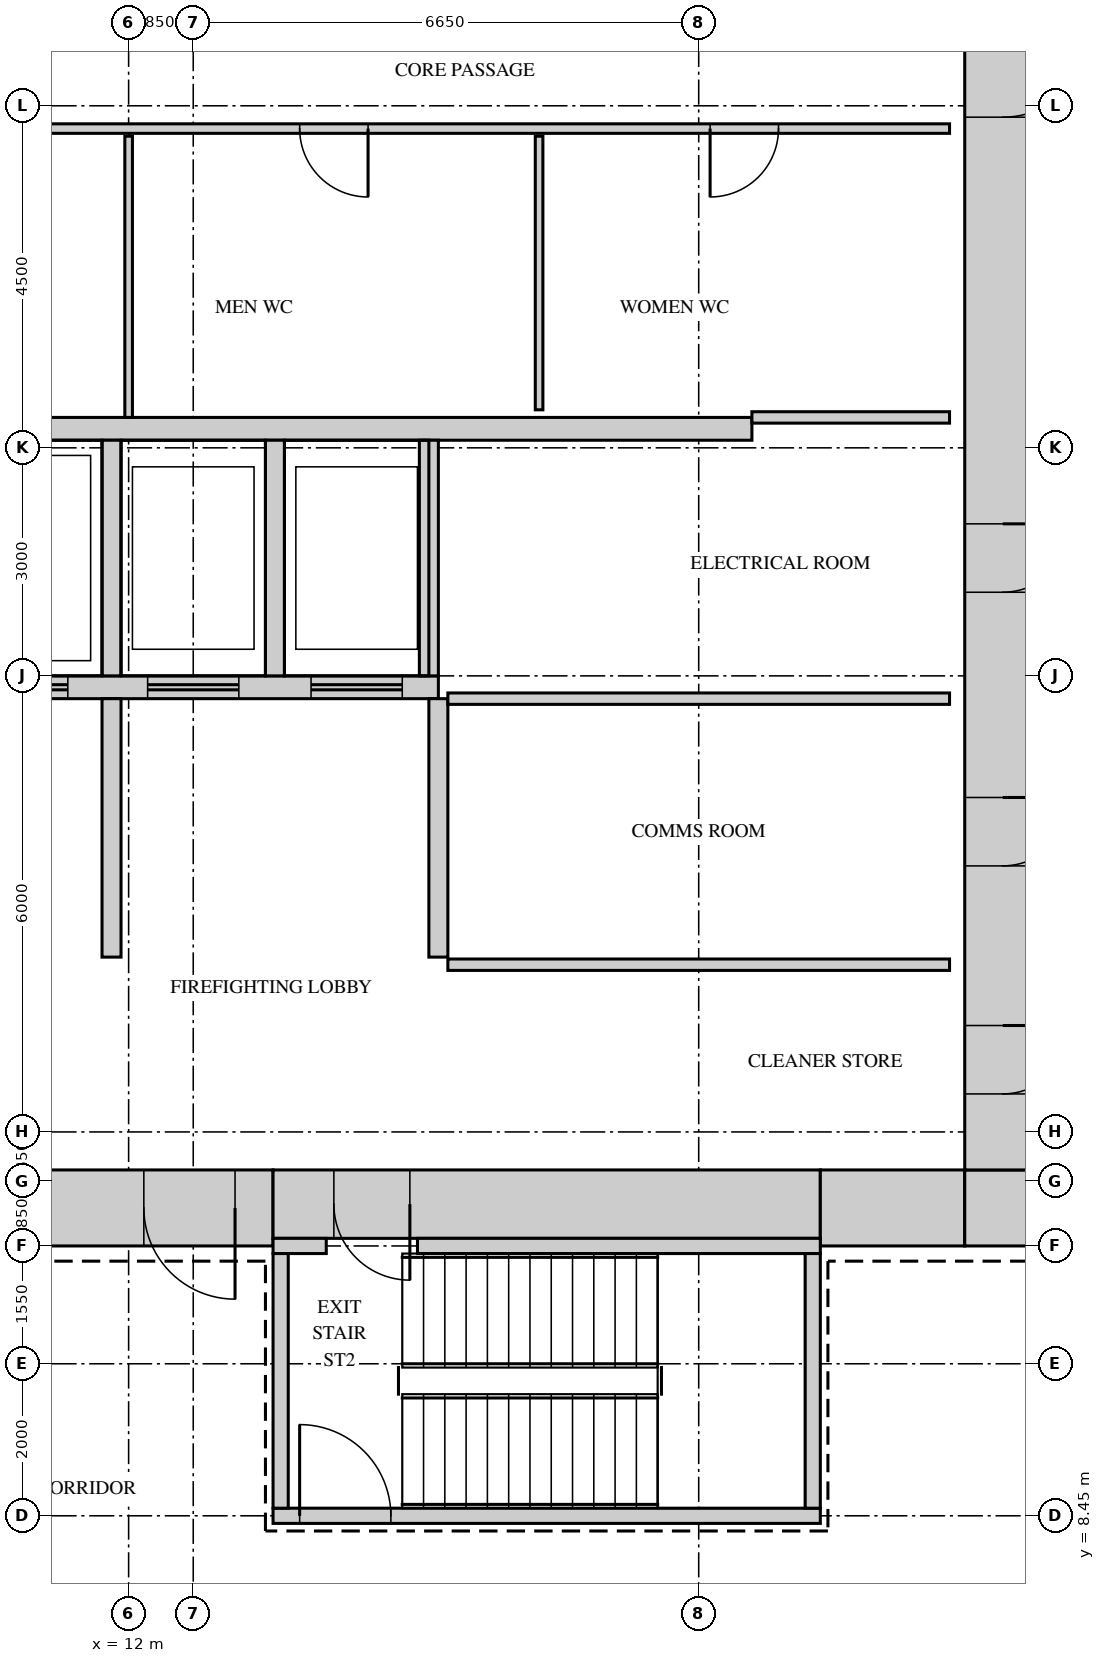
"""IFC4 building model, lengths in metres.
Left out: names, types, materials, properties, quantities, classifications, styles, units other than length and angle.
Written with IfcOpenShell. Run it as: python <this file> out.ifc"""

import sys

from ifc_helpers import new_model, si_unit, direction, frame, frame_2d, origin, place, context, subcontext, project, spatial, rectangle, extrude, source, transform, mapped, element, fill, save


model = new_model("IFC4")
c1 = context("Model", 3, precision=1e-05, world=origin(), true_north=direction((0.0, 1.0)))
c2 = subcontext(c1, "Body", "Model", "MODEL_VIEW")
j1 = project(units=[si_unit("LENGTHUNIT", "METRE"), si_unit("PLANEANGLEUNIT", "RADIAN")], contexts=[c1])
p1 = place(None, origin())
s1 = spatial("IfcSite", under=j1, at=p1, CompositionType="ELEMENT")
p2 = place(p1, origin())
s2 = spatial("IfcBuilding", under=s1, at=p2, CompositionType="ELEMENT")
p3 = place(p2, frame((0.0, 0.0, 101.5)))
s3 = spatial("IfcBuildingStorey", under=s2, at=p3, CompositionType="ELEMENT", Elevation=101.5)
m1 = source(origin(), c2, "Body", "SweptSolid", [
    extrude(rectangle(XDim=6.9, YDim=1.0, at=frame_2d((3.45, 0.0))), origin(), (0.0, 0.0, 1.0), 4.1),
])
p4 = place(p3, frame((7.0, 12.5, 0.0), z_axis=(0.0, 0.0, 1.0), x_axis=(1.0, 0.0, 0.0)))
e1 = element("IfcWall", 1, at=p4, inside=s3, PredefinedType="SHEAR", context=c2, shape_type="MappedRepresentation", body=[
    mapped(m1, transform((0.0, 0.0, 0.0))),
])
m2 = source(origin(), c2, "Body", "SweptSolid", [
    extrude(rectangle(XDim=1.2, YDim=2.1, at=frame_2d((0.6, 1.05))), frame((0.0, 0.51, 0.0), z_axis=(0.0, -1.0, 0.0), x_axis=(1.0, 0.0, 0.0)), (0.0, 0.0, 1.0), 1.02),
])
p5 = place(p4, frame((5.2, 0.0, 0.0)))
e2 = element("IfcOpeningElement", 2, at=p5, cuts=e1, PredefinedType="OPENING", context=c2, shape_type="MappedRepresentation", body=[
    mapped(m2, transform((0.0, 0.0, 0.0))),
])
p6 = place(p4, frame((1.85, 0.0, 0.0)))
e3 = element("IfcOpeningElement", 3, at=p6, cuts=e1, PredefinedType="OPENING", context=c2, shape_type="MappedRepresentation", body=[
    mapped(m2, transform((0.0, 0.0, 0.0))),
])
m3 = source(origin(), c2, "Body", "SweptSolid", [
    extrude(rectangle(XDim=7.2, YDim=0.9, at=frame_2d((3.6, 0.0))), origin(), (0.0, 0.0, 1.0), 4.1),
])
p7 = place(p3, frame((13.9, 12.55, 0.0), z_axis=(0.0, 0.0, 1.0), x_axis=(1.0, 0.0, 0.0)))
e4 = element("IfcWall", 4, at=p7, inside=s3, PredefinedType="SHEAR", context=c2, shape_type="MappedRepresentation", body=[
    mapped(m3, transform((0.0, 0.0, 0.0))),
])
m4 = source(origin(), c2, "Body", "SweptSolid", [
    extrude(rectangle(XDim=1.0, YDim=2.1, at=frame_2d((0.5, 1.05))), frame((0.0, 0.46, 0.0), z_axis=(0.0, -1.0, 0.0), x_axis=(1.0, 0.0, 0.0)), (0.0, 0.0, 1.0), 0.92),
])
p8 = place(p7, frame((0.8, 0.0, 0.0)))
e5 = element("IfcOpeningElement", 5, at=p8, cuts=e4, PredefinedType="OPENING", context=c2, shape_type="MappedRepresentation", body=[
    mapped(m4, transform((0.0, 0.0, 0.0))),
])
m5 = source(origin(), c2, "Body", "SweptSolid", [
    extrude(rectangle(XDim=1.9, YDim=1.0, at=frame_2d((0.95, 0.0))), origin(), (0.0, 0.0, 1.0), 4.1),
])
p9 = place(p3, frame((21.1, 12.5, 0.0), z_axis=(0.0, 0.0, 1.0), x_axis=(1.0, 0.0, 0.0)))
e6 = element("IfcWall", 6, at=p9, inside=s3, PredefinedType="SHEAR", context=c2, shape_type="MappedRepresentation", body=[
    mapped(m5, transform((0.0, 0.0, 0.0))),
])
m6 = source(origin(), c2, "Body", "SweptSolid", [
    extrude(rectangle(XDim=1.0, YDim=1.0, at=frame_2d((0.5, 0.0))), origin(), (0.0, 0.0, 1.0), 4.1),
])
p10 = place(p3, frame((23.0, 12.5, 0.0), z_axis=(0.0, 0.0, 1.0), x_axis=(1.0, 0.0, 0.0)))
e7 = element("IfcWall", 7, at=p10, inside=s3, PredefinedType="SHEAR", context=c2, shape_type="MappedRepresentation", body=[
    mapped(m6, transform((0.0, 0.0, 0.0))),
])
m7 = source(origin(), c2, "Body", "SweptSolid", [
    extrude(rectangle(XDim=28.0, YDim=1.0, at=frame_2d((14.0, 0.0))), origin(), (0.0, 0.0, 1.0), 4.1),
])
p11 = place(p3, frame((23.5, 13.0, 0.0), z_axis=(0.0, 0.0, 1.0), x_axis=(0.0, 1.0, 0.0)))
e8 = element("IfcWall", 8, at=p11, inside=s3, PredefinedType="SHEAR", context=c2, shape_type="MappedRepresentation", body=[
    mapped(m7, transform((0.0, 0.0, 0.0))),
])
m8 = source(origin(), c2, "Body", "SweptSolid", [
    extrude(rectangle(XDim=1.8, YDim=2.1, at=frame_2d((0.9, 1.05))), frame((0.0, 0.51, 0.0), z_axis=(0.0, -1.0, 0.0), x_axis=(1.0, 0.0, 0.0)), (0.0, 0.0, 1.0), 1.02),
])
p12 = place(p11, frame((22.6, 0.0, 0.0)))
e9 = element("IfcOpeningElement", 9, at=p12, cuts=e8, PredefinedType="OPENING", context=c2, shape_type="MappedRepresentation", body=[
    mapped(m8, transform((0.0, 0.0, 0.0))),
])
p13 = place(p11, frame((13.85, 0.0, 0.0)))
e10 = element("IfcOpeningElement", 10, at=p13, cuts=e8, PredefinedType="OPENING", context=c2, shape_type="MappedRepresentation", body=[
    mapped(m2, transform((0.0, 0.0, 0.0))),
])
m9 = source(origin(), c2, "Body", "SweptSolid", [
    extrude(rectangle(XDim=0.9, YDim=2.1, at=frame_2d((0.45, 1.05))), frame((0.0, 0.51, 0.0), z_axis=(0.0, -1.0, 0.0), x_axis=(1.0, 0.0, 0.0)), (0.0, 0.0, 1.0), 1.02),
])
p14 = place(p11, frame((1.0, 0.0, 0.0)))
e11 = element("IfcOpeningElement", 11, at=p14, cuts=e8, PredefinedType="OPENING", context=c2, shape_type="MappedRepresentation", body=[
    mapped(m9, transform((0.0, 0.0, 0.0))),
])
p15 = place(p11, frame((4.0, 0.0, 0.0)))
e12 = element("IfcOpeningElement", 12, at=p15, cuts=e8, PredefinedType="OPENING", context=c2, shape_type="MappedRepresentation", body=[
    mapped(m9, transform((0.0, 0.0, 0.0))),
])
p16 = place(p11, frame((7.6, 0.0, 0.0)))
e13 = element("IfcOpeningElement", 13, at=p16, cuts=e8, PredefinedType="OPENING", context=c2, shape_type="MappedRepresentation", body=[
    mapped(m9, transform((0.0, 0.0, 0.0))),
])
m10 = source(origin(), c2, "Body", "SweptSolid", [
    extrude(rectangle(XDim=0.7, YDim=0.2, at=frame_2d((0.35, 0.0))), origin(), (0.0, 0.0, 1.0), 4.1),
])
p17 = place(p3, frame((13.9, 12.0, 0.0), z_axis=(0.0, 0.0, 1.0), x_axis=(1.0, 0.0, 0.0)))
e14 = element("IfcWall", 14, at=p17, inside=s3, PredefinedType="SHEAR", context=c2, shape_type="MappedRepresentation", body=[
    mapped(m10, transform((0.0, 0.0, 0.0))),
])
m11 = source(origin(), c2, "Body", "SweptSolid", [
    extrude(rectangle(XDim=5.3, YDim=0.2, at=frame_2d((2.65, 0.0))), origin(), (0.0, 0.0, 1.0), 4.1),
])
p18 = place(p3, frame((15.8, 12.0, 0.0), z_axis=(0.0, 0.0, 1.0), x_axis=(1.0, 0.0, 0.0)))
e15 = element("IfcWall", 15, at=p18, inside=s3, PredefinedType="SHEAR", context=c2, shape_type="MappedRepresentation", body=[
    mapped(m11, transform((0.0, 0.0, 0.0))),
])
m12 = source(origin(), c2, "Body", "SweptSolid", [
    extrude(rectangle(XDim=7.2, YDim=0.2, at=frame_2d((3.6, 0.0))), origin(), (0.0, 0.0, 1.0), 4.1),
])
p19 = place(p3, frame((13.9, 8.45, 0.0), z_axis=(0.0, 0.0, 1.0), x_axis=(1.0, 0.0, 0.0)))
e16 = element("IfcWall", 16, at=p19, inside=s3, PredefinedType="SHEAR", context=c2, shape_type="MappedRepresentation", body=[
    mapped(m12, transform((0.0, 0.0, 0.0))),
])
m13 = source(origin(), c2, "Body", "SweptSolid", [
    extrude(rectangle(XDim=1.2, YDim=2.1, at=frame_2d((0.6, 1.05))), frame((0.0, 0.11, 0.0), z_axis=(0.0, -1.0, 0.0), x_axis=(1.0, 0.0, 0.0)), (0.0, 0.0, 1.0), 0.22),
])
p20 = place(p19, frame((0.35, 0.0, 0.0)))
e17 = element("IfcOpeningElement", 17, at=p20, cuts=e16, PredefinedType="OPENING", context=c2, shape_type="MappedRepresentation", body=[
    mapped(m13, transform((0.0, 0.0, 0.0))),
])
m14 = source(origin(), c2, "Body", "SweptSolid", [
    extrude(rectangle(XDim=3.35, YDim=0.2, at=frame_2d((1.675, 0.0))), origin(), (0.0, 0.0, 1.0), 4.1),
])
for number, where, z_axis, x_axis in (
    (18, (21.0, 8.55, 0.0), (0.0, 0.0, 1.0), (0.0, 1.0, 0.0)),
    (19, (14.0, 8.55, 0.0), (0.0, 0.0, 1.0), (0.0, 1.0, 0.0)),
):
    element("IfcWall", number, at=place(p3, frame(where, z_axis=z_axis, x_axis=x_axis)), inside=s3, PredefinedType="SHEAR", context=c2, shape_type="MappedRepresentation", body=[
        mapped(m14, transform((0.0, 0.0, 0.0))),
    ])
m15 = source(origin(), c2, "Body", "SweptSolid", [
    extrude(rectangle(XDim=13.2, YDim=0.3, at=frame_2d((6.6, 0.0))), origin(), (0.0, 0.0, 1.0), 4.1),
])
p21 = place(p3, frame((7.0, 22.75, 0.0), z_axis=(0.0, 0.0, 1.0), x_axis=(1.0, 0.0, 0.0)))
e20 = element("IfcWall", 20, at=p21, inside=s3, PredefinedType="STANDARD", context=c2, shape_type="MappedRepresentation", body=[
    mapped(m15, transform((0.0, 0.0, 0.0))),
])
m16 = source(origin(), c2, "Body", "SweptSolid", [
    extrude(rectangle(XDim=9.075, YDim=0.3, at=frame_2d((4.538, 0.0))), origin(), (0.0, 0.0, 1.0), 4.1),
])
p22 = place(p3, frame((7.0, 19.35, 0.0), z_axis=(0.0, 0.0, 1.0), x_axis=(1.0, 0.0, 0.0)))
e21 = element("IfcWall", 21, at=p22, inside=s3, PredefinedType="STANDARD", context=c2, shape_type="MappedRepresentation", body=[
    mapped(m16, transform((0.0, 0.0, 0.0))),
])
m17 = source(origin(), c2, "Body", "SweptSolid", [
    extrude(rectangle(XDim=1.2, YDim=2.1, at=frame_2d((0.6, 1.05))), frame((0.0, 0.16, 0.0), z_axis=(0.0, -1.0, 0.0), x_axis=(1.0, 0.0, 0.0)), (0.0, 0.0, 1.0), 0.32),
])
p23 = place(p22, frame((0.65, 0.0, 0.0)))
e22 = element("IfcOpeningElement", 22, at=p23, cuts=e21, PredefinedType="OPENING", context=c2, shape_type="MappedRepresentation", body=[
    mapped(m17, transform((0.0, 0.0, 0.0))),
])
p24 = place(p22, frame((3.0, 0.0, 0.0)))
e23 = element("IfcOpeningElement", 23, at=p24, cuts=e21, PredefinedType="OPENING", context=c2, shape_type="MappedRepresentation", body=[
    mapped(m17, transform((0.0, 0.0, 0.0))),
])
p25 = place(p22, frame((5.25, 0.0, 0.0)))
e24 = element("IfcOpeningElement", 24, at=p25, cuts=e21, PredefinedType="OPENING", context=c2, shape_type="MappedRepresentation", body=[
    mapped(m17, transform((0.0, 0.0, 0.0))),
])
p26 = place(p22, frame((7.4, 0.0, 0.0)))
e25 = element("IfcOpeningElement", 25, at=p26, cuts=e21, PredefinedType="OPENING", context=c2, shape_type="MappedRepresentation", body=[
    mapped(m17, transform((0.0, 0.0, 0.0))),
])
m18 = source(origin(), c2, "Body", "SweptSolid", [
    extrude(rectangle(XDim=3.1, YDim=0.25, at=frame_2d((1.55, 0.0))), origin(), (0.0, 0.0, 1.0), 4.1),
])
for number, where, z_axis, x_axis in (
    (26, (11.775, 19.5, 0.0), (0.0, 0.0, 1.0), (0.0, 1.0, 0.0)),
    (27, (13.925, 19.5, 0.0), (0.0, 0.0, 1.0), (0.0, 1.0, 0.0)),
    (28, (15.95, 19.5, 0.0), (0.0, 0.0, 1.0), (0.0, 1.0, 0.0)),
):
    element("IfcWall", number, at=place(p3, frame(where, z_axis=z_axis, x_axis=x_axis)), inside=s3, PredefinedType="STANDARD", context=c2, shape_type="MappedRepresentation", body=[
        mapped(m18, transform((0.0, 0.0, 0.0))),
    ])
m19 = source(origin(), c2, "Body", "SweptSolid", [
    extrude(rectangle(XDim=3.4, YDim=0.25, at=frame_2d((1.7, 0.0))), origin(), (0.0, 0.0, 1.0), 4.1),
])
for number, where, z_axis, x_axis in (
    (29, (16.075, 15.8, 0.0), (0.0, 0.0, 1.0), (0.0, 1.0, 0.0)),
    (30, (11.775, 15.8, 0.0), (0.0, 0.0, 1.0), (0.0, 1.0, 0.0)),
):
    element("IfcWall", number, at=place(p3, frame(where, z_axis=z_axis, x_axis=x_axis)), inside=s3, PredefinedType="STANDARD", context=c2, shape_type="MappedRepresentation", body=[
        mapped(m19, transform((0.0, 0.0, 0.0))),
    ])
m20 = source(origin(), c2, "Body", "SweptSolid", [
    extrude(rectangle(XDim=6.6, YDim=0.15, at=frame_2d((3.3, 0.0))), origin(), (0.0, 0.0, 1.0), 4.2),
])
for number, where, z_axis, x_axis in (
    (31, (16.2, 15.7, 0.0), (0.0, 0.0, 1.0), (1.0, 0.0, 0.0)),
    (32, (16.2, 19.2, 0.0), (0.0, 0.0, 1.0), (1.0, 0.0, 0.0)),
):
    element("IfcWall", number, at=place(p3, frame(where, z_axis=z_axis, x_axis=x_axis)), inside=s3, PredefinedType="PARTITIONING", context=c2, shape_type="MappedRepresentation", body=[
        mapped(m20, transform((0.0, 0.0, 0.0))),
    ])
m21 = source(origin(), c2, "Body", "SweptSolid", [
    extrude(rectangle(XDim=3.7, YDim=0.1, at=frame_2d((1.85, 0.0))), origin(), (0.0, 0.0, 1.0), 4.2),
])
p27 = place(p3, frame((12.0, 22.9, 0.0), z_axis=(0.0, 0.0, 1.0), x_axis=(0.0, 1.0, 0.0)))
e33 = element("IfcWall", 33, at=p27, inside=s3, PredefinedType="PARTITIONING", context=c2, shape_type="MappedRepresentation", body=[
    mapped(m21, transform((0.0, 0.0, 0.0))),
])
m22 = source(origin(), c2, "Body", "SweptSolid", [
    extrude(rectangle(XDim=2.6, YDim=0.15, at=frame_2d((1.3, 0.0))), origin(), (0.0, 0.0, 1.0), 4.2),
])
p28 = place(p3, frame((20.2, 22.9, 0.0), z_axis=(0.0, 0.0, 1.0), x_axis=(1.0, 0.0, 0.0)))
e34 = element("IfcWall", 34, at=p28, inside=s3, PredefinedType="PARTITIONING", context=c2, shape_type="MappedRepresentation", body=[
    mapped(m22, transform((0.0, 0.0, 0.0))),
])
m23 = source(origin(), c2, "Body", "SweptSolid", [
    extrude(rectangle(XDim=3.6, YDim=0.1, at=frame_2d((1.8, 0.0))), origin(), (0.0, 0.0, 1.0), 4.2),
])
p29 = place(p3, frame((17.4, 23.0, 0.0), z_axis=(0.0, 0.0, 1.0), x_axis=(0.0, 1.0, 0.0)))
e35 = element("IfcWall", 35, at=p29, inside=s3, PredefinedType="PARTITIONING", context=c2, shape_type="MappedRepresentation", body=[
    mapped(m23, transform((0.0, 0.0, 0.0))),
])
m24 = source(origin(), c2, "Body", "SweptSolid", [
    extrude(rectangle(XDim=15.6, YDim=0.125, at=frame_2d((7.8, 0.0))), origin(), (0.0, 0.0, 1.0), 4.2),
])
p30 = place(p3, frame((7.2, 26.7, 0.0), z_axis=(0.0, 0.0, 1.0), x_axis=(1.0, 0.0, 0.0)))
e36 = element("IfcWall", 36, at=p30, inside=s3, PredefinedType="PARTITIONING", context=c2, shape_type="MappedRepresentation", body=[
    mapped(m24, transform((0.0, 0.0, 0.0))),
])
m25 = source(origin(), c2, "Body", "SweptSolid", [
    extrude(rectangle(XDim=1.0, YDim=2.1, at=frame_2d((0.5, 1.05))), frame((0.0, 0.073, 0.0), z_axis=(0.0, -1.0, 0.0), x_axis=(1.0, 0.0, 0.0)), (0.0, 0.0, 1.0), 0.145),
])
p31 = place(p30, frame((1.9, 0.0, 0.0)))
e37 = element("IfcOpeningElement", 37, at=p31, cuts=e36, PredefinedType="OPENING", context=c2, shape_type="MappedRepresentation", body=[
    mapped(m25, transform((0.0, 0.0, 0.0))),
])
m26 = source(origin(), c2, "Body", "SweptSolid", [
    extrude(rectangle(XDim=0.9, YDim=2.1, at=frame_2d((0.45, 1.05))), frame((0.0, 0.073, 0.0), z_axis=(0.0, -1.0, 0.0), x_axis=(1.0, 0.0, 0.0)), (0.0, 0.0, 1.0), 0.145),
])
p32 = place(p30, frame((7.05, 0.0, 0.0)))
e38 = element("IfcOpeningElement", 38, at=p32, cuts=e36, PredefinedType="OPENING", context=c2, shape_type="MappedRepresentation", body=[
    mapped(m26, transform((0.0, 0.0, 0.0))),
])
p33 = place(p30, frame((12.45, 0.0, 0.0)))
e39 = element("IfcOpeningElement", 39, at=p33, cuts=e36, PredefinedType="OPENING", context=c2, shape_type="MappedRepresentation", body=[
    mapped(m26, transform((0.0, 0.0, 0.0))),
])
m27 = source(origin(), c2, "Body", "SweptSolid", [
    extrude(rectangle(XDim=1.2, YDim=2.1, at=frame_2d((0.6, 1.05))), frame((0.0, 0.45, 0.0), z_axis=(0.0, -1.0, 0.0), x_axis=(1.0, 0.0, 0.0)), (0.0, 0.0, 1.0), 0.9),
])
p34 = place(p13, origin())
e40 = element("IfcDoor", 40, at=p34, inside=s3, OperationType="SINGLE_SWING_RIGHT", PredefinedType="DOOR", context=c2, shape_type="MappedRepresentation", body=[
    mapped(m27, transform((0.0, 0.0, 0.0))),
])
fill(e10, e40)
m28 = source(origin(), c2, "Body", "SweptSolid", [
    extrude(rectangle(XDim=0.9, YDim=2.1, at=frame_2d((0.45, 1.05))), frame((0.0, 0.025, 0.0), z_axis=(0.0, -1.0, 0.0), x_axis=(1.0, 0.0, 0.0)), (0.0, 0.0, 1.0), 0.05),
])
p35 = place(p32, origin())
e41 = element("IfcDoor", 41, at=p35, inside=s3, OperationType="SINGLE_SWING_RIGHT", PredefinedType="DOOR", context=c2, shape_type="MappedRepresentation", body=[
    mapped(m28, transform((0.0, 0.0, 0.0))),
])
fill(e38, e41)
p36 = place(p33, origin())
e42 = element("IfcDoor", 42, at=p36, inside=s3, OperationType="SINGLE_SWING_LEFT", PredefinedType="DOOR", context=c2, shape_type="MappedRepresentation", body=[
    mapped(m28, transform((0.0, 0.0, 0.0))),
])
fill(e39, e42)
m29 = source(origin(), c2, "Body", "SweptSolid", [
    extrude(rectangle(XDim=0.9, YDim=2.1, at=frame_2d((0.45, 1.05))), frame((0.0, 0.45, 0.0), z_axis=(0.0, -1.0, 0.0), x_axis=(1.0, 0.0, 0.0)), (0.0, 0.0, 1.0), 0.9),
])
p37 = place(p14, origin())
e43 = element("IfcDoor", 43, at=p37, inside=s3, OperationType="SINGLE_SWING_RIGHT", PredefinedType="DOOR", context=c2, shape_type="MappedRepresentation", body=[
    mapped(m29, transform((0.0, 0.0, 0.0))),
])
fill(e11, e43)
p38 = place(p15, origin())
e44 = element("IfcDoor", 44, at=p38, inside=s3, OperationType="SINGLE_SWING_RIGHT", PredefinedType="DOOR", context=c2, shape_type="MappedRepresentation", body=[
    mapped(m29, transform((0.0, 0.0, 0.0))),
])
fill(e12, e44)
p39 = place(p16, origin())
e45 = element("IfcDoor", 45, at=p39, inside=s3, OperationType="SINGLE_SWING_RIGHT", PredefinedType="DOOR", context=c2, shape_type="MappedRepresentation", body=[
    mapped(m29, transform((0.0, 0.0, 0.0))),
])
fill(e13, e45)
p40 = place(p5, origin())
e46 = element("IfcDoor", 46, at=p40, inside=s3, OperationType="SINGLE_SWING_RIGHT", PredefinedType="DOOR", context=c2, shape_type="MappedRepresentation", body=[
    mapped(m27, transform((0.0, 0.0, 0.0))),
])
fill(e2, e46)
m30 = source(origin(), c2, "Body", "SweptSolid", [
    extrude(rectangle(XDim=1.0, YDim=2.1, at=frame_2d((0.5, 1.05))), frame((0.0, 0.4, 0.0), z_axis=(0.0, -1.0, 0.0), x_axis=(1.0, 0.0, 0.0)), (0.0, 0.0, 1.0), 0.8),
])
p41 = place(p8, origin())
e47 = element("IfcDoor", 47, at=p41, inside=s3, OperationType="SINGLE_SWING_RIGHT", PredefinedType="DOOR", context=c2, shape_type="MappedRepresentation", body=[
    mapped(m30, transform((0.0, 0.0, 0.0))),
])
fill(e5, e47)
m31 = source(origin(), c2, "Body", "SweptSolid", [
    extrude(rectangle(XDim=1.2, YDim=2.1, at=frame_2d((0.6, 1.05))), frame((0.0, 0.025, 0.0), z_axis=(0.0, -1.0, 0.0), x_axis=(1.0, 0.0, 0.0)), (0.0, 0.0, 1.0), 0.05),
])
p42 = place(p20, origin())
e48 = element("IfcDoor", 48, at=p42, inside=s3, OperationType="SINGLE_SWING_RIGHT", PredefinedType="DOOR", context=c2, shape_type="MappedRepresentation", body=[
    mapped(m31, transform((0.0, 0.0, 0.0))),
])
fill(e17, e48)
p43 = place(p24, origin())
e49 = element("IfcDoor", 49, at=p43, inside=s3, OperationType="DOUBLE_DOOR_SLIDING", PredefinedType="DOOR", context=c2, shape_type="MappedRepresentation", body=[
    mapped(m31, transform((0.0, 0.0, 0.0))),
])
fill(e23, e49)
p44 = place(p25, origin())
e50 = element("IfcDoor", 50, at=p44, inside=s3, OperationType="DOUBLE_DOOR_SLIDING", PredefinedType="DOOR", context=c2, shape_type="MappedRepresentation", body=[
    mapped(m31, transform((0.0, 0.0, 0.0))),
])
fill(e24, e50)
p45 = place(p26, origin())
e51 = element("IfcDoor", 51, at=p45, inside=s3, OperationType="DOUBLE_DOOR_SLIDING", PredefinedType="DOOR", context=c2, shape_type="MappedRepresentation", body=[
    mapped(m31, transform((0.0, 0.0, 0.0))),
])
fill(e25, e51)
save(model, sys.argv[1])
